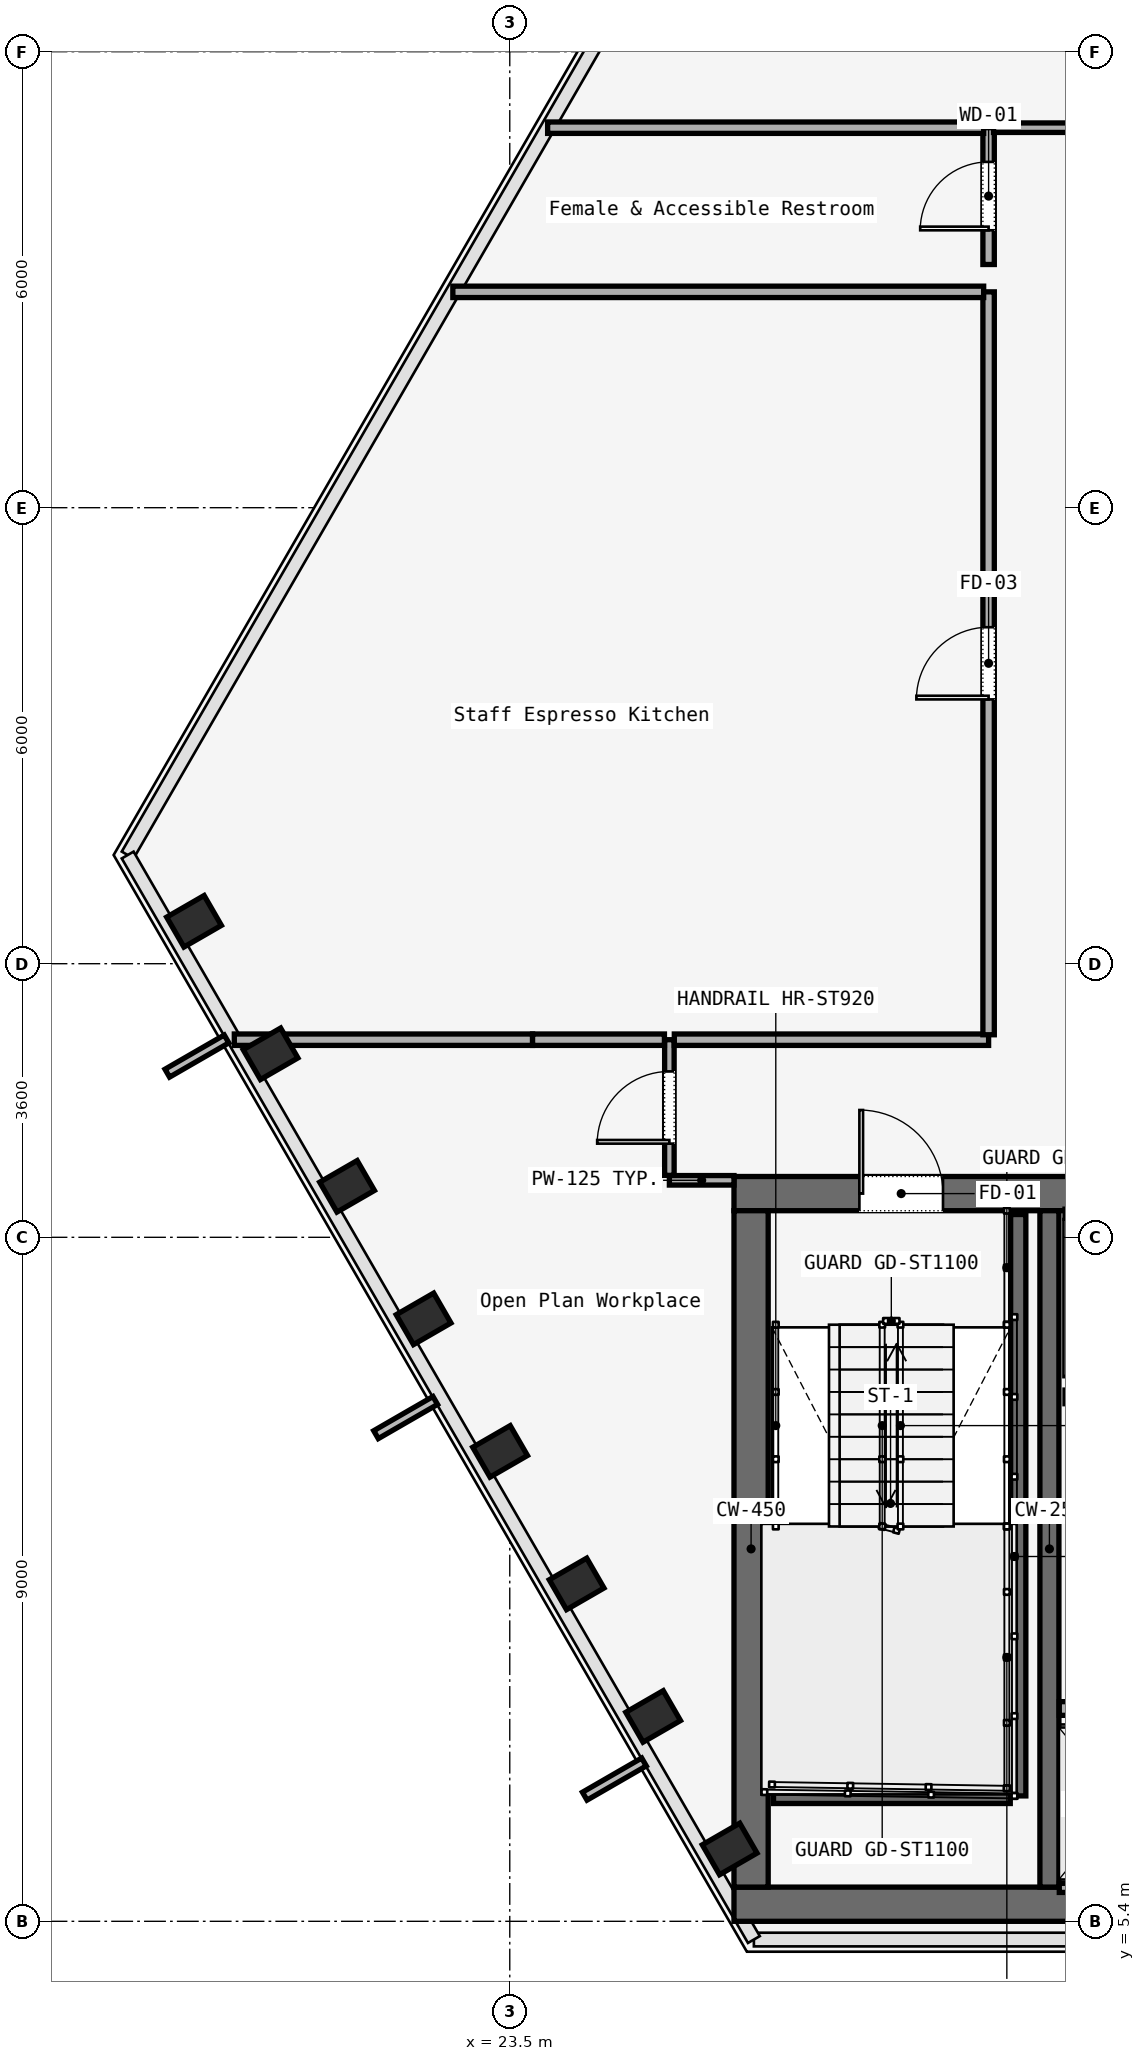
"""IFC4 building model, lengths in metres.
Left out: names, types, materials, properties, quantities, classifications, styles, units other than length and angle.
Written with IfcOpenShell. Run it as: python <this file> out.ifc"""

import sys

from ifc_helpers import new_model, si_unit, direction, frame, frame_2d, origin, origin_2d, place, context, subcontext, project, spatial, rectangle, i_section, extrude, element, fill, save


model = new_model("IFC4")
c1 = context("Model", 3, precision=1e-05, world=origin(), true_north=direction((0.0, 1.0)))
c2 = subcontext(c1, "Body", "Model", "MODEL_VIEW")
j1 = project(units=[si_unit("LENGTHUNIT", "METRE"), si_unit("PLANEANGLEUNIT", "RADIAN")], contexts=[c1])
p1 = place(None, origin())
s1 = spatial("IfcSite", under=j1, at=p1, CompositionType="ELEMENT")
p2 = place(p1, origin())
s2 = spatial("IfcBuilding", under=s1, at=p2, CompositionType="ELEMENT")
p3 = place(p2, frame((0.0, 0.0, 39.8)))
s3 = spatial("IfcBuildingStorey", under=s2, at=p3, CompositionType="ELEMENT", Elevation=39.8)
p4 = place(p3, frame((26.45, 14.975, 0.0), z_axis=(0.0, 0.0, 1.0), x_axis=(1.0, 0.0, 0.0)))
e1 = element("IfcWall", 1, at=p4, inside=s3, PredefinedType="SOLIDWALL", context=c2, shape_type="SweptSolid", body=[
    extrude(rectangle(XDim=31.1, YDim=0.45, at=frame_2d((15.55, 0.0))), origin(), (0.0, 0.0, 1.0), 3.58),
])
p5 = place(p4, frame((1.65, 0.0, 0.0)))
e2 = element("IfcOpeningElement", 2, at=p5, cuts=e1, PredefinedType="OPENING", context=c2, shape_type="SweptSolid", body=[
    extrude(rectangle(XDim=1.1, YDim=2.2, at=frame_2d((0.55, 1.1))), frame((0.0, 0.225, 0.0), z_axis=(0.0, -1.0, 0.0), x_axis=(1.0, 0.0, 0.0)), (0.0, 0.0, 1.0), 0.45),
])
p6 = place(p4, frame((13.65, 0.0, 0.0)))
e3 = element("IfcOpeningElement", 3, at=p6, cuts=e1, PredefinedType="OPENING", context=c2, shape_type="SweptSolid", body=[
    extrude(rectangle(XDim=1.1, YDim=2.2, at=frame_2d((0.55, 1.1))), frame((0.0, 0.225, 0.0), z_axis=(0.0, -1.0, 0.0), x_axis=(1.0, 0.0, 0.0)), (0.0, 0.0, 1.0), 0.45),
])
p7 = place(p4, frame((25.55, 0.0, 0.0)))
e4 = element("IfcOpeningElement", 4, at=p7, cuts=e1, PredefinedType="OPENING", context=c2, shape_type="SweptSolid", body=[
    extrude(rectangle(XDim=1.1, YDim=2.2, at=frame_2d((0.55, 1.1))), frame((0.0, 0.225, 0.0), z_axis=(0.0, -1.0, 0.0), x_axis=(1.0, 0.0, 0.0)), (0.0, 0.0, 1.0), 0.45),
])
p8 = place(p4, frame((10.7, 0.0, 0.0)))
e5 = element("IfcOpeningElement", 5, at=p8, cuts=e1, PredefinedType="OPENING", context=c2, shape_type="SweptSolid", body=[
    extrude(rectangle(XDim=1.4, YDim=2.2, at=frame_2d((0.7, 1.1))), frame((0.0, 0.225, 0.0), z_axis=(0.0, -1.0, 0.0), x_axis=(1.0, 0.0, 0.0)), (0.0, 0.0, 1.0), 0.45),
])
p9 = place(p4, frame((19.35, 0.0, 0.0)))
e6 = element("IfcOpeningElement", 6, at=p9, cuts=e1, PredefinedType="OPENING", context=c2, shape_type="SweptSolid", body=[
    extrude(rectangle(XDim=1.1, YDim=2.2, at=frame_2d((0.55, 1.1))), frame((0.0, 0.225, 0.0), z_axis=(0.0, -1.0, 0.0), x_axis=(1.0, 0.0, 0.0)), (0.0, 0.0, 1.0), 0.45),
])
p10 = place(p4, frame((21.4, 0.0, 0.0)))
e7 = element("IfcOpeningElement", 7, at=p10, cuts=e1, PredefinedType="OPENING", context=c2, shape_type="SweptSolid", body=[
    extrude(rectangle(XDim=0.9, YDim=2.1, at=frame_2d((0.45, 1.05))), frame((0.0, 0.225, 0.0), z_axis=(0.0, -1.0, 0.0), x_axis=(1.0, 0.0, 0.0)), (0.0, 0.0, 1.0), 0.45),
])
p11 = place(p4, frame((23.35, 0.0, 0.0)))
e8 = element("IfcOpeningElement", 8, at=p11, cuts=e1, PredefinedType="OPENING", context=c2, shape_type="SweptSolid", body=[
    extrude(rectangle(XDim=1.3, YDim=2.3, at=frame_2d((0.65, 1.15))), frame((0.0, 0.225, 0.0), z_axis=(0.0, -1.0, 0.0), x_axis=(1.0, 0.0, 0.0)), (0.0, 0.0, 1.0), 0.45),
])
p12 = place(p3, frame((26.45, 5.625, 0.0), z_axis=(0.0, 0.0, 1.0), x_axis=(1.0, 0.0, 0.0)))
e9 = element("IfcWall", 9, at=p12, inside=s3, PredefinedType="SOLIDWALL", context=c2, shape_type="SweptSolid", body=[
    extrude(rectangle(XDim=31.1, YDim=0.45, at=frame_2d((15.55, 0.0))), origin(), (0.0, 0.0, 1.0), 3.58),
])
p13 = place(p3, frame((26.675, 5.85, 0.0), z_axis=(0.0, 0.0, 1.0), x_axis=(0.0, 1.0, 0.0)))
e10 = element("IfcWall", 10, at=p13, inside=s3, PredefinedType="SOLIDWALL", context=c2, shape_type="SweptSolid", body=[
    extrude(rectangle(XDim=8.9, YDim=0.45, at=frame_2d((4.45, 0.0))), origin(), (0.0, 0.0, 1.0), 3.58),
])
p14 = place(p3, frame((30.6, 5.85, 0.0), z_axis=(0.0, 0.0, 1.0), x_axis=(0.0, 1.0, 0.0)))
e11 = element("IfcWall", 11, at=p14, inside=s3, PredefinedType="SOLIDWALL", context=c2, shape_type="SweptSolid", body=[
    extrude(rectangle(XDim=8.9, YDim=0.25, at=frame_2d((4.45, 0.0))), origin(), (0.0, 0.0, 1.0), 3.58),
])
for number, where, z_axis, x_axis in (
    (12, (19.346, 18.558, 0.0), (0.0, 0.0, 1.0), (-0.5, 0.866, 0.0)),
    (13, (20.353, 16.814, 0.0), (0.0, 0.0, 1.0), (-0.5, 0.866, 0.0)),
    (14, (21.359, 15.071, 0.0), (0.0, 0.0, 1.0), (-0.5, 0.866, 0.0)),
    (15, (22.366, 13.327, 0.0), (0.0, 0.0, 1.0), (-0.5, 0.866, 0.0)),
    (16, (23.373, 11.583, 0.0), (0.0, 0.0, 1.0), (-0.5, 0.866, 0.0)),
    (17, (24.38, 9.839, 0.0), (0.0, 0.0, 1.0), (-0.5, 0.866, 0.0)),
    (18, (25.386, 8.096, 0.0), (0.0, 0.0, 1.0), (-0.5, 0.866, 0.0)),
    (19, (26.393, 6.352, 0.0), (0.0, 0.0, 1.0), (-0.5, 0.866, 0.0)),
):
    element("IfcColumn", number, at=place(p3, frame(where, z_axis=z_axis, x_axis=x_axis)), inside=s3, PredefinedType="COLUMN", context=c2, shape_type="SweptSolid", body=[
        extrude(i_section(OverallWidth=0.454, OverallDepth=0.569, WebThickness=0.078, FlangeThickness=0.08, FilletRadius=0.015, at=origin_2d()), origin(), (0.0, 0.0, 1.0), 3.58),
    ])
p15 = place(p3, frame((30.19, 14.7, 0.0), z_axis=(0.0, 0.0, 1.0), x_axis=(0.0, -1.0, 0.0)))
e20 = element("IfcWall", 20, at=p15, inside=s3, PredefinedType="SOLIDWALL", context=c2, shape_type="SweptSolid", body=[
    extrude(rectangle(XDim=7.65, YDim=0.2, at=frame_2d((3.825, 0.0))), origin(), (0.0, 0.0, 1.0), 3.8),
])
p16 = place(p3, frame((26.97, 7.05, 0.0), z_axis=(0.0, 0.0, 1.0), x_axis=(1.0, 0.0, 0.0)))
e21 = element("IfcWall", 21, at=p16, inside=s3, PredefinedType="SOLIDWALL", context=c2, shape_type="SweptSolid", body=[
    extrude(rectangle(XDim=3.115, YDim=0.2, at=frame_2d((1.558, 0.0))), origin(), (0.0, 0.0, 1.0), 3.8),
])
p17 = place(p3, frame((30.73, 8.2, 0.0), z_axis=(0.0, 0.0, 1.0), x_axis=(1.0, 0.0, 0.0)))
e22 = element("IfcWall", 22, at=p17, inside=s3, PredefinedType="SOLIDWALL", context=c2, shape_type="SweptSolid", body=[
    extrude(rectangle(XDim=1.665, YDim=0.18, at=frame_2d((0.833, 0.0))), origin(), (0.0, 0.0, 1.0), 2.933),
])
p18 = place(p17, frame((0.282, 0.0, 0.0)))
e23 = element("IfcOpeningElement", 23, at=p18, cuts=e22, PredefinedType="OPENING", context=c2, shape_type="SweptSolid", body=[
    extrude(rectangle(XDim=1.1, YDim=2.2, at=frame_2d((0.55, 1.1))), frame((0.0, 0.09, 0.0), z_axis=(0.0, -1.0, 0.0), x_axis=(1.0, 0.0, 0.0)), (0.0, 0.0, 1.0), 0.18),
])
p19 = place(p3, frame((30.73, 5.84, 0.0), z_axis=(0.0, 0.0, 1.0), x_axis=(1.0, 0.0, 0.0)))
e24 = element("IfcWall", 24, at=p19, inside=s3, PredefinedType="SOLIDWALL", context=c2, shape_type="SweptSolid", body=[
    extrude(rectangle(XDim=1.665, YDim=0.12, at=frame_2d((0.833, 0.0))), origin(), (0.0, 0.0, 1.0), 2.933),
])
p20 = place(p3, frame((26.45, 15.15, 0.0), z_axis=(0.0, 0.0, 1.0), x_axis=(-1.0, 0.0, 0.0)))
e25 = element("IfcWall", 25, at=p20, inside=s3, PredefinedType="PARTITIONING", context=c2, shape_type="SweptSolid", body=[
    extrude(rectangle(XDim=0.85, YDim=0.125, at=frame_2d((0.425, 0.0))), origin(), (0.0, 0.0, 1.0), 2.933),
])
p21 = place(p3, frame((25.6, 15.215, 0.0), z_axis=(0.0, 0.0, 1.0), x_axis=(0.0, 1.0, 0.0)))
e26 = element("IfcWall", 26, at=p21, inside=s3, PredefinedType="PARTITIONING", context=c2, shape_type="SweptSolid", body=[
    extrude(rectangle(XDim=1.785, YDim=0.125, at=frame_2d((0.893, 0.0))), origin(), (0.0, 0.0, 1.0), 2.933),
])
p22 = place(p21, frame((0.417, 0.0, 0.0)))
e27 = element("IfcOpeningElement", 27, at=p22, cuts=e26, PredefinedType="OPENING", context=c2, shape_type="SweptSolid", body=[
    extrude(rectangle(XDim=0.95, YDim=2.2, at=frame_2d((0.475, 1.1))), frame((0.0, 0.062, 0.0), z_axis=(0.0, -1.0, 0.0), x_axis=(1.0, 0.0, 0.0)), (0.0, 0.0, 1.0), 0.125),
])
p23 = place(p3, frame((25.665, 17.0, 0.0), z_axis=(0.0, 0.0, 1.0), x_axis=(1.0, 0.0, 0.0)))
e28 = element("IfcWall", 28, at=p23, inside=s3, PredefinedType="PARTITIONING", context=c2, shape_type="SweptSolid", body=[
    extrude(rectangle(XDim=4.135, YDim=0.15, at=frame_2d((2.067, 0.0))), origin(), (0.0, 0.0, 1.0), 2.933),
])
p24 = place(p3, frame((29.8, 17.065, 0.0), z_axis=(0.0, 0.0, 1.0), x_axis=(0.0, 1.0, 0.0)))
e29 = element("IfcWall", 29, at=p24, inside=s3, PredefinedType="PARTITIONING", context=c2, shape_type="SweptSolid", body=[
    extrude(rectangle(XDim=9.775, YDim=0.15, at=frame_2d((4.888, 0.0))), origin(), (0.0, 0.0, 1.0), 2.933),
])
p25 = place(p24, frame((4.413, 0.0, 0.0)))
e30 = element("IfcOpeningElement", 30, at=p25, cuts=e29, PredefinedType="OPENING", context=c2, shape_type="SweptSolid", body=[
    extrude(rectangle(XDim=0.95, YDim=2.2, at=frame_2d((0.475, 1.1))), frame((0.0, 0.075, 0.0), z_axis=(0.0, -1.0, 0.0), x_axis=(1.0, 0.0, 0.0)), (0.0, 0.0, 1.0), 0.15),
])
p26 = place(p3, frame((29.8, 27.2, 0.0), z_axis=(0.0, 0.0, 1.0), x_axis=(0.0, 1.0, 0.0)))
e31 = element("IfcWall", 31, at=p26, inside=s3, PredefinedType="PARTITIONING", context=c2, shape_type="SweptSolid", body=[
    extrude(rectangle(XDim=1.8, YDim=0.15, at=frame_2d((0.9, 0.0))), origin(), (0.0, 0.0, 1.0), 2.933),
])
p27 = place(p26, frame((0.45, 0.0, 0.0)))
e32 = element("IfcOpeningElement", 32, at=p27, cuts=e31, PredefinedType="OPENING", context=c2, shape_type="SweptSolid", body=[
    extrude(rectangle(XDim=0.9, YDim=2.15, at=frame_2d((0.45, 1.075))), frame((0.0, 0.075, 0.0), z_axis=(0.0, -1.0, 0.0), x_axis=(1.0, 0.0, 0.0)), (0.0, 0.0, 1.0), 0.15),
])
p28 = place(p3, frame((29.865, 29.0, 0.0), z_axis=(0.0, 0.0, 1.0), x_axis=(1.0, 0.0, 0.0)))
e33 = element("IfcWall", 33, at=p28, inside=s3, PredefinedType="PARTITIONING", context=c2, shape_type="SweptSolid", body=[
    extrude(rectangle(XDim=1.735, YDim=0.125, at=frame_2d((0.868, 0.0))), origin(), (0.0, 0.0, 1.0), 2.933),
])
p29 = place(p3, frame((19.876, 17.0, 0.0), z_axis=(0.0, 0.0, 1.0), x_axis=(1.0, 0.0, 0.0)))
e34 = element("IfcWall", 34, at=p29, inside=s3, PredefinedType="PARTITIONING", context=c2, shape_type="SweptSolid", body=[
    extrude(rectangle(XDim=3.924, YDim=0.15, at=frame_2d((1.962, 0.0))), origin(), (0.0, 0.0, 1.0), 2.933),
])
p30 = place(p3, frame((23.8, 17.0, 0.0), z_axis=(0.0, 0.0, 1.0), x_axis=(1.0, 0.0, 0.0)))
e35 = element("IfcWall", 35, at=p30, inside=s3, PredefinedType="PARTITIONING", context=c2, shape_type="SweptSolid", body=[
    extrude(rectangle(XDim=1.735, YDim=0.15, at=frame_2d((0.867, 0.0))), origin(), (0.0, 0.0, 1.0), 2.933),
])
p31 = place(p3, frame((22.751, 26.84, 0.0), z_axis=(0.0, 0.0, 1.0), x_axis=(1.0, 0.0, 0.0)))
e36 = element("IfcWall", 36, at=p31, inside=s3, PredefinedType="PARTITIONING", context=c2, shape_type="SweptSolid", body=[
    extrude(rectangle(XDim=6.984, YDim=0.15, at=frame_2d((3.492, 0.0))), origin(), (0.0, 0.0, 1.0), 2.933),
])
p32 = place(p3, frame((23.998, 29.0, 0.0), z_axis=(0.0, 0.0, 1.0), x_axis=(1.0, 0.0, 0.0)))
e37 = element("IfcWall", 37, at=p32, inside=s3, PredefinedType="PARTITIONING", context=c2, shape_type="SweptSolid", body=[
    extrude(rectangle(XDim=5.737, YDim=0.15, at=frame_2d((2.868, 0.0))), origin(), (0.0, 0.0, 1.0), 2.933),
])
p33 = place(p5, origin())
e38 = element("IfcDoor", 38, at=p33, inside=s3, OperationType="SINGLE_SWING_RIGHT", PredefinedType="DOOR", context=c2, shape_type="SweptSolid", body=[
    extrude(rectangle(XDim=1.1, YDim=2.2, at=frame_2d((0.55, 1.1))), frame((0.0, 0.025, 0.0), z_axis=(0.0, -1.0, 0.0), x_axis=(1.0, 0.0, 0.0)), (0.0, 0.0, 1.0), 0.05),
])
fill(e2, e38)
p34 = place(p22, origin())
e39 = element("IfcDoor", 39, at=p34, inside=s3, OperationType="SINGLE_SWING_RIGHT", PredefinedType="DOOR", context=c2, shape_type="SweptSolid", body=[
    extrude(rectangle(XDim=0.95, YDim=2.2, at=frame_2d((0.475, 1.1))), frame((0.0, 0.025, 0.0), z_axis=(0.0, -1.0, 0.0), x_axis=(1.0, 0.0, 0.0)), (0.0, 0.0, 1.0), 0.05),
])
fill(e27, e39)
p35 = place(p25, origin())
e40 = element("IfcDoor", 40, at=p35, inside=s3, OperationType="SINGLE_SWING_RIGHT", PredefinedType="DOOR", context=c2, shape_type="SweptSolid", body=[
    extrude(rectangle(XDim=0.95, YDim=2.2, at=frame_2d((0.475, 1.1))), frame((0.0, 0.025, 0.0), z_axis=(0.0, -1.0, 0.0), x_axis=(1.0, 0.0, 0.0)), (0.0, 0.0, 1.0), 0.05),
])
fill(e30, e40)
p36 = place(p27, origin())
e41 = element("IfcDoor", 41, at=p36, inside=s3, OperationType="SINGLE_SWING_LEFT", PredefinedType="DOOR", context=c2, shape_type="SweptSolid", body=[
    extrude(rectangle(XDim=0.9, YDim=2.15, at=frame_2d((0.45, 1.075))), frame((0.0, 0.025, 0.0), z_axis=(0.0, -1.0, 0.0), x_axis=(1.0, 0.0, 0.0)), (0.0, 0.0, 1.0), 0.05),
])
fill(e32, e41)
save(model, sys.argv[1])
